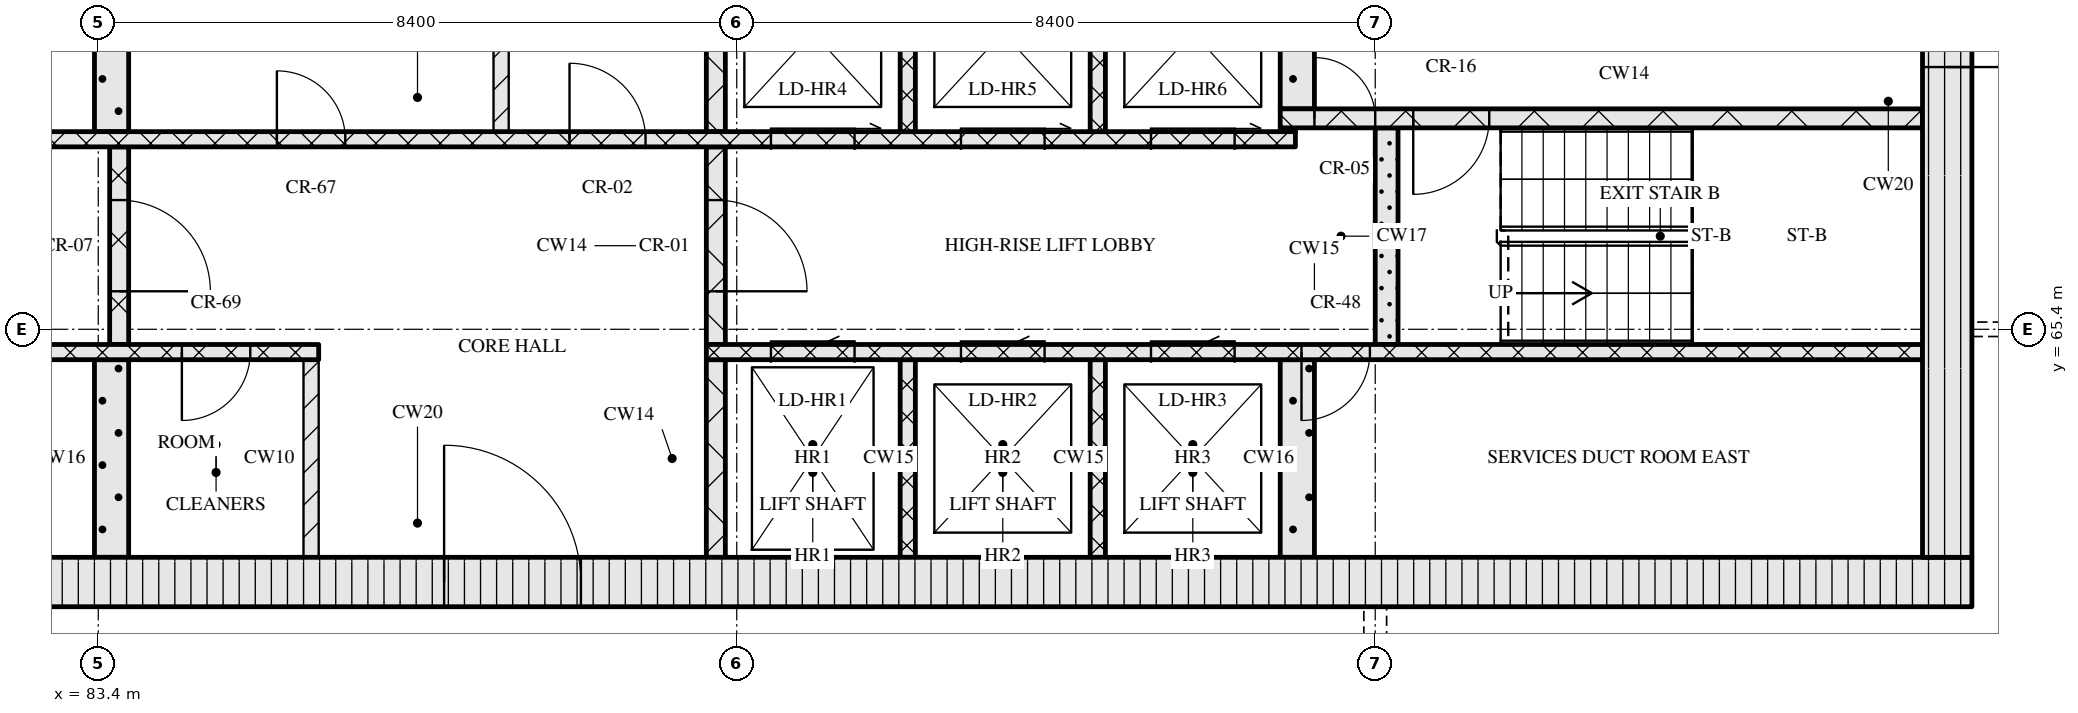
"""IFC4 building model, lengths in metres.
Left out: names, types, materials, properties, quantities, classifications, styles, units other than length and angle.
Written with IfcOpenShell. Run it as: python <this file> out.ifc"""

import sys

from ifc_helpers import new_model, si_unit, direction, frame, frame_2d, origin, place, context, subcontext, project, spatial, rectangle, extrude, element, fill, save


model = new_model("IFC4")
c1 = context("Model", 3, precision=1e-05, world=origin(), true_north=direction((0.0, 1.0)))
c2 = subcontext(c1, "Body", "Model", "MODEL_VIEW")
j1 = project(units=[si_unit("LENGTHUNIT", "METRE"), si_unit("PLANEANGLEUNIT", "RADIAN")], contexts=[c1])
p1 = place(None, origin())
s1 = spatial("IfcSite", under=j1, at=p1, CompositionType="ELEMENT")
p2 = place(p1, origin())
s2 = spatial("IfcBuilding", under=s1, at=p2, CompositionType="ELEMENT")
p3 = place(p2, frame((0.0, 0.0, 219.9)))
s3 = spatial("IfcBuildingStorey", under=s2, at=p3, CompositionType="ELEMENT", Elevation=219.9)
p4 = place(p3, frame((67.15, 62.075, 0.0), z_axis=(0.0, 0.0, 1.0), x_axis=(1.0, 0.0, 0.0)))
e1 = element("IfcWall", 1, at=p4, inside=s3, PredefinedType="SOLIDWALL", context=c2, shape_type="SweptSolid", body=[
    extrude(rectangle(XDim=40.9, YDim=0.65, at=frame_2d((20.45, 0.0))), origin(), (0.0, 0.0, 1.0), 3.32),
])
p5 = place(p4, frame((20.8, 0.0, 0.0)))
e2 = element("IfcOpeningElement", 2, at=p5, cuts=e1, PredefinedType="OPENING", context=c2, shape_type="SweptSolid", body=[
    extrude(rectangle(XDim=1.8, YDim=2.1, at=frame_2d((0.9, 1.05))), frame((0.0, 0.335, 0.0), z_axis=(0.0, -1.0, 0.0), x_axis=(1.0, 0.0, 0.0)), (0.0, 0.0, 1.0), 0.67),
])
p6 = place(p3, frame((107.725, 62.4, 0.0), z_axis=(0.0, 0.0, 1.0), x_axis=(0.0, 1.0, 0.0)))
e3 = element("IfcWall", 3, at=p6, inside=s3, PredefinedType="SOLIDWALL", context=c2, shape_type="SweptSolid", body=[
    extrude(rectangle(XDim=12.0, YDim=0.65, at=frame_2d((6.0, 0.0))), origin(), (0.0, 0.0, 1.0), 3.32),
])
p7 = place(p6, frame((6.45, 0.0, 0.0)))
e4 = element("IfcOpeningElement", 4, at=p7, cuts=e3, PredefinedType="OPENING", context=c2, shape_type="SweptSolid", body=[
    extrude(rectangle(XDim=1.2, YDim=2.1, at=frame_2d((0.6, 1.05))), frame((0.0, 0.335, 0.0), z_axis=(0.0, -1.0, 0.0), x_axis=(1.0, 0.0, 0.0)), (0.0, 0.0, 1.0), 0.67),
])
p8 = place(p3, frame((83.575, 62.4, 0.0), z_axis=(0.0, 0.0, 1.0), x_axis=(0.0, 1.0, 0.0)))
e5 = element("IfcWall", 5, at=p8, inside=s3, PredefinedType="SOLIDWALL", context=c2, shape_type="SweptSolid", body=[
    extrude(rectangle(XDim=2.6, YDim=0.45, at=frame_2d((1.3, 0.0))), origin(), (0.0, 0.0, 1.0), 3.32),
])
p9 = place(p3, frame((86.2, 62.4, 0.0), z_axis=(0.0, 0.0, 1.0), x_axis=(0.0, 1.0, 0.0)))
e6 = element("IfcWall", 6, at=p9, inside=s3, PredefinedType="PARTITIONING", context=c2, shape_type="SweptSolid", body=[
    extrude(rectangle(XDim=2.6, YDim=0.2, at=frame_2d((1.3, 0.0))), origin(), (0.0, 0.0, 1.0), 3.32),
])
p10 = place(p3, frame((91.525, 62.4, 0.0), z_axis=(0.0, 0.0, 1.0), x_axis=(0.0, 1.0, 0.0)))
e7 = element("IfcWall", 7, at=p10, inside=s3, PredefinedType="SOLIDWALL", context=c2, shape_type="SweptSolid", body=[
    extrude(rectangle(XDim=2.6, YDim=0.25, at=frame_2d((1.3, 0.0))), origin(), (0.0, 0.0, 1.0), 3.32),
])
for number, where, z_axis, x_axis in (
    (8, (94.05, 62.4, 0.0), (0.0, 0.0, 1.0), (0.0, 1.0, 0.0)),
    (9, (96.55, 62.4, 0.0), (0.0, 0.0, 1.0), (0.0, 1.0, 0.0)),
):
    element("IfcWall", number, at=place(p3, frame(where, z_axis=z_axis, x_axis=x_axis)), inside=s3, PredefinedType="SOLIDWALL", context=c2, shape_type="SweptSolid", body=[
        extrude(rectangle(XDim=2.6, YDim=0.2, at=frame_2d((1.3, 0.0))), origin(), (0.0, 0.0, 1.0), 3.32),
    ])
p11 = place(p3, frame((99.175, 62.4, 0.0), z_axis=(0.0, 0.0, 1.0), x_axis=(0.0, 1.0, 0.0)))
e10 = element("IfcWall", 10, at=p11, inside=s3, PredefinedType="SOLIDWALL", context=c2, shape_type="SweptSolid", body=[
    extrude(rectangle(XDim=2.6, YDim=0.45, at=frame_2d((1.3, 0.0))), origin(), (0.0, 0.0, 1.0), 3.32),
])
p12 = place(p3, frame((67.8, 65.1, 0.0), z_axis=(0.0, 0.0, 1.0), x_axis=(1.0, 0.0, 0.0)))
e11 = element("IfcWall", 11, at=p12, inside=s3, PredefinedType="SOLIDWALL", context=c2, shape_type="SweptSolid", body=[
    extrude(rectangle(XDim=18.5, YDim=0.2, at=frame_2d((9.25, 0.0))), origin(), (0.0, 0.0, 1.0), 3.32),
])
p13 = place(p12, frame((7.27, 0.0, 0.0)))
e12 = element("IfcOpeningElement", 12, at=p13, cuts=e11, PredefinedType="OPENING", context=c2, shape_type="SweptSolid", body=[
    extrude(rectangle(XDim=0.9, YDim=2.1, at=frame_2d((0.45, 1.05))), frame((0.0, 0.11, 0.0), z_axis=(0.0, -1.0, 0.0), x_axis=(1.0, 0.0, 0.0)), (0.0, 0.0, 1.0), 0.22),
])
p14 = place(p12, frame((10.1, 0.0, 0.0)))
e13 = element("IfcOpeningElement", 13, at=p14, cuts=e11, PredefinedType="OPENING", context=c2, shape_type="SweptSolid", body=[
    extrude(rectangle(XDim=0.9, YDim=2.1, at=frame_2d((0.45, 1.05))), frame((0.0, 0.11, 0.0), z_axis=(0.0, -1.0, 0.0), x_axis=(1.0, 0.0, 0.0)), (0.0, 0.0, 1.0), 0.22),
])
p15 = place(p12, frame((13.81, 0.0, 0.0)))
e14 = element("IfcOpeningElement", 14, at=p15, cuts=e11, PredefinedType="OPENING", context=c2, shape_type="SweptSolid", body=[
    extrude(rectangle(XDim=0.9, YDim=2.1, at=frame_2d((0.45, 1.05))), frame((0.0, 0.11, 0.0), z_axis=(0.0, -1.0, 0.0), x_axis=(1.0, 0.0, 0.0)), (0.0, 0.0, 1.0), 0.22),
])
p16 = place(p12, frame((16.7, 0.0, 0.0)))
e15 = element("IfcOpeningElement", 15, at=p16, cuts=e11, PredefinedType="OPENING", context=c2, shape_type="SweptSolid", body=[
    extrude(rectangle(XDim=0.9, YDim=2.1, at=frame_2d((0.45, 1.05))), frame((0.0, 0.11, 0.0), z_axis=(0.0, -1.0, 0.0), x_axis=(1.0, 0.0, 0.0)), (0.0, 0.0, 1.0), 0.22),
])
p17 = place(p3, frame((91.4, 65.1, 0.0), z_axis=(0.0, 0.0, 1.0), x_axis=(1.0, 0.0, 0.0)))
e16 = element("IfcWall", 16, at=p17, inside=s3, PredefinedType="SOLIDWALL", context=c2, shape_type="SweptSolid", body=[
    extrude(rectangle(XDim=16.0, YDim=0.2, at=frame_2d((8.0, 0.0))), origin(), (0.0, 0.0, 1.0), 3.32),
])
p18 = place(p17, frame((0.85, 0.0, 0.0)))
e17 = element("IfcOpeningElement", 17, at=p18, cuts=e16, PredefinedType="OPENING", context=c2, shape_type="SweptSolid", body=[
    extrude(rectangle(XDim=1.1, YDim=2.1, at=frame_2d((0.55, 1.05))), frame((0.0, 0.11, 0.0), z_axis=(0.0, -1.0, 0.0), x_axis=(1.0, 0.0, 0.0)), (0.0, 0.0, 1.0), 0.22),
])
p19 = place(p17, frame((3.35, 0.0, 0.0)))
e18 = element("IfcOpeningElement", 18, at=p19, cuts=e16, PredefinedType="OPENING", context=c2, shape_type="SweptSolid", body=[
    extrude(rectangle(XDim=1.1, YDim=2.1, at=frame_2d((0.55, 1.05))), frame((0.0, 0.11, 0.0), z_axis=(0.0, -1.0, 0.0), x_axis=(1.0, 0.0, 0.0)), (0.0, 0.0, 1.0), 0.22),
])
p20 = place(p17, frame((5.85, 0.0, 0.0)))
e19 = element("IfcOpeningElement", 19, at=p20, cuts=e16, PredefinedType="OPENING", context=c2, shape_type="SweptSolid", body=[
    extrude(rectangle(XDim=1.1, YDim=2.1, at=frame_2d((0.55, 1.05))), frame((0.0, 0.11, 0.0), z_axis=(0.0, -1.0, 0.0), x_axis=(1.0, 0.0, 0.0)), (0.0, 0.0, 1.0), 0.22),
])
p21 = place(p17, frame((7.83, 0.0, 0.0)))
e20 = element("IfcOpeningElement", 20, at=p21, cuts=e16, PredefinedType="OPENING", context=c2, shape_type="SweptSolid", body=[
    extrude(rectangle(XDim=0.9, YDim=2.1, at=frame_2d((0.45, 1.05))), frame((0.0, 0.11, 0.0), z_axis=(0.0, -1.0, 0.0), x_axis=(1.0, 0.0, 0.0)), (0.0, 0.0, 1.0), 0.22),
])
p22 = place(p3, frame((83.675, 65.2, 0.0), z_axis=(0.0, 0.0, 1.0), x_axis=(0.0, 1.0, 0.0)))
e21 = element("IfcWall", 21, at=p22, inside=s3, PredefinedType="SOLIDWALL", context=c2, shape_type="SweptSolid", body=[
    extrude(rectangle(XDim=2.6, YDim=0.25, at=frame_2d((1.3, 0.0))), origin(), (0.0, 0.0, 1.0), 3.32),
])
p23 = place(p22, frame((0.7, 0.0, 0.0)))
e22 = element("IfcOpeningElement", 22, at=p23, cuts=e21, PredefinedType="OPENING", context=c2, shape_type="SweptSolid", body=[
    extrude(rectangle(XDim=1.2, YDim=2.1, at=frame_2d((0.6, 1.05))), frame((0.0, 0.135, 0.0), z_axis=(0.0, -1.0, 0.0), x_axis=(1.0, 0.0, 0.0)), (0.0, 0.0, 1.0), 0.27),
])
p24 = place(p3, frame((91.525, 65.2, 0.0), z_axis=(0.0, 0.0, 1.0), x_axis=(0.0, 1.0, 0.0)))
e23 = element("IfcWall", 23, at=p24, inside=s3, PredefinedType="SOLIDWALL", context=c2, shape_type="SweptSolid", body=[
    extrude(rectangle(XDim=2.6, YDim=0.25, at=frame_2d((1.3, 0.0))), origin(), (0.0, 0.0, 1.0), 3.32),
])
p25 = place(p24, frame((0.7, 0.0, 0.0)))
e24 = element("IfcOpeningElement", 24, at=p25, cuts=e23, PredefinedType="OPENING", context=c2, shape_type="SweptSolid", body=[
    extrude(rectangle(XDim=1.2, YDim=2.1, at=frame_2d((0.6, 1.05))), frame((0.0, 0.135, 0.0), z_axis=(0.0, -1.0, 0.0), x_axis=(1.0, 0.0, 0.0)), (0.0, 0.0, 1.0), 0.27),
])
p26 = place(p3, frame((100.35, 65.2, 0.0), z_axis=(0.0, 0.0, 1.0), x_axis=(0.0, 1.0, 0.0)))
e25 = element("IfcWall", 25, at=p26, inside=s3, PredefinedType="SOLIDWALL", context=c2, shape_type="SweptSolid", body=[
    extrude(rectangle(XDim=2.85, YDim=0.3, at=frame_2d((1.425, 0.0))), origin(), (0.0, 0.0, 1.0), 3.32),
])
p27 = place(p3, frame((76.05, 67.9, 0.0), z_axis=(0.0, 0.0, 1.0), x_axis=(1.0, 0.0, 0.0)))
e26 = element("IfcWall", 26, at=p27, inside=s3, PredefinedType="SOLIDWALL", context=c2, shape_type="SweptSolid", body=[
    extrude(rectangle(XDim=23.1, YDim=0.2, at=frame_2d((11.55, 0.0))), origin(), (0.0, 0.0, 1.0), 3.32),
])
p28 = place(p27, frame((3.2, 0.0, 0.0)))
e27 = element("IfcOpeningElement", 27, at=p28, cuts=e26, PredefinedType="OPENING", context=c2, shape_type="SweptSolid", body=[
    extrude(rectangle(XDim=0.9, YDim=2.1, at=frame_2d((0.45, 1.05))), frame((0.0, 0.11, 0.0), z_axis=(0.0, -1.0, 0.0), x_axis=(1.0, 0.0, 0.0)), (0.0, 0.0, 1.0), 0.22),
])
p29 = place(p27, frame((9.7, 0.0, 0.0)))
e28 = element("IfcOpeningElement", 28, at=p29, cuts=e26, PredefinedType="OPENING", context=c2, shape_type="SweptSolid", body=[
    extrude(rectangle(XDim=0.9, YDim=2.1, at=frame_2d((0.45, 1.05))), frame((0.0, 0.11, 0.0), z_axis=(0.0, -1.0, 0.0), x_axis=(1.0, 0.0, 0.0)), (0.0, 0.0, 1.0), 0.22),
])
p30 = place(p27, frame((13.55, 0.0, 0.0)))
e29 = element("IfcOpeningElement", 29, at=p30, cuts=e26, PredefinedType="OPENING", context=c2, shape_type="SweptSolid", body=[
    extrude(rectangle(XDim=1.0, YDim=2.1, at=frame_2d((0.5, 1.05))), frame((0.0, 0.11, 0.0), z_axis=(0.0, -1.0, 0.0), x_axis=(1.0, 0.0, 0.0)), (0.0, 0.0, 1.0), 0.22),
])
p31 = place(p27, frame((16.2, 0.0, 0.0)))
e30 = element("IfcOpeningElement", 30, at=p31, cuts=e26, PredefinedType="OPENING", context=c2, shape_type="SweptSolid", body=[
    extrude(rectangle(XDim=1.1, YDim=2.1, at=frame_2d((0.55, 1.05))), frame((0.0, 0.11, 0.0), z_axis=(0.0, -1.0, 0.0), x_axis=(1.0, 0.0, 0.0)), (0.0, 0.0, 1.0), 0.22),
])
p32 = place(p27, frame((18.7, 0.0, 0.0)))
e31 = element("IfcOpeningElement", 31, at=p32, cuts=e26, PredefinedType="OPENING", context=c2, shape_type="SweptSolid", body=[
    extrude(rectangle(XDim=1.1, YDim=2.1, at=frame_2d((0.55, 1.05))), frame((0.0, 0.11, 0.0), z_axis=(0.0, -1.0, 0.0), x_axis=(1.0, 0.0, 0.0)), (0.0, 0.0, 1.0), 0.22),
])
p33 = place(p27, frame((21.2, 0.0, 0.0)))
e32 = element("IfcOpeningElement", 32, at=p33, cuts=e26, PredefinedType="OPENING", context=c2, shape_type="SweptSolid", body=[
    extrude(rectangle(XDim=1.1, YDim=2.1, at=frame_2d((0.55, 1.05))), frame((0.0, 0.11, 0.0), z_axis=(0.0, -1.0, 0.0), x_axis=(1.0, 0.0, 0.0)), (0.0, 0.0, 1.0), 0.22),
])
p34 = place(p3, frame((83.575, 68.0, 0.0), z_axis=(0.0, 0.0, 1.0), x_axis=(0.0, 1.0, 0.0)))
e33 = element("IfcWall", 33, at=p34, inside=s3, PredefinedType="SOLIDWALL", context=c2, shape_type="SweptSolid", body=[
    extrude(rectangle(XDim=2.6, YDim=0.45, at=frame_2d((1.3, 0.0))), origin(), (0.0, 0.0, 1.0), 3.32),
])
p35 = place(p3, frame((88.7, 68.0, 0.0), z_axis=(0.0, 0.0, 1.0), x_axis=(0.0, 1.0, 0.0)))
e34 = element("IfcWall", 34, at=p35, inside=s3, PredefinedType="PARTITIONING", context=c2, shape_type="SweptSolid", body=[
    extrude(rectangle(XDim=2.6, YDim=0.2, at=frame_2d((1.3, 0.0))), origin(), (0.0, 0.0, 1.0), 3.32),
])
p36 = place(p3, frame((91.525, 68.0, 0.0), z_axis=(0.0, 0.0, 1.0), x_axis=(0.0, 1.0, 0.0)))
e35 = element("IfcWall", 35, at=p36, inside=s3, PredefinedType="SOLIDWALL", context=c2, shape_type="SweptSolid", body=[
    extrude(rectangle(XDim=2.6, YDim=0.25, at=frame_2d((1.3, 0.0))), origin(), (0.0, 0.0, 1.0), 3.32),
])
for number, where, z_axis, x_axis in (
    (36, (94.05, 68.0, 0.0), (0.0, 0.0, 1.0), (0.0, 1.0, 0.0)),
    (37, (96.55, 68.0, 0.0), (0.0, 0.0, 1.0), (0.0, 1.0, 0.0)),
):
    element("IfcWall", number, at=place(p3, frame(where, z_axis=z_axis, x_axis=x_axis)), inside=s3, PredefinedType="SOLIDWALL", context=c2, shape_type="SweptSolid", body=[
        extrude(rectangle(XDim=2.6, YDim=0.2, at=frame_2d((1.3, 0.0))), origin(), (0.0, 0.0, 1.0), 3.32),
    ])
p37 = place(p3, frame((98.95, 68.025, 0.0), z_axis=(0.0, 0.0, 1.0), x_axis=(1.0, 0.0, 0.0)))
e38 = element("IfcWall", 38, at=p37, inside=s3, PredefinedType="SOLIDWALL", context=c2, shape_type="SweptSolid", body=[
    extrude(rectangle(XDim=0.2, YDim=0.05, at=frame_2d((0.1, 0.0))), origin(), (0.0, 0.0, 1.0), 3.32),
])
p38 = place(p3, frame((98.95, 68.175, 0.0), z_axis=(0.0, 0.0, 1.0), x_axis=(1.0, 0.0, 0.0)))
e39 = element("IfcWall", 39, at=p38, inside=s3, PredefinedType="SOLIDWALL", context=c2, shape_type="SweptSolid", body=[
    extrude(rectangle(XDim=8.45, YDim=0.25, at=frame_2d((4.225, 0.0))), origin(), (0.0, 0.0, 1.0), 3.32),
])
p39 = place(p38, frame((0.45, 0.0, 0.0)))
e40 = element("IfcOpeningElement", 40, at=p39, cuts=e39, PredefinedType="OPENING", context=c2, shape_type="SweptSolid", body=[
    extrude(rectangle(XDim=0.8, YDim=2.1, at=frame_2d((0.4, 1.05))), frame((0.0, 0.135, 0.0), z_axis=(0.0, -1.0, 0.0), x_axis=(1.0, 0.0, 0.0)), (0.0, 0.0, 1.0), 0.27),
])
p40 = place(p38, frame((1.75, 0.0, 0.0)))
e41 = element("IfcOpeningElement", 41, at=p40, cuts=e39, PredefinedType="OPENING", context=c2, shape_type="SweptSolid", body=[
    extrude(rectangle(XDim=1.0, YDim=2.1, at=frame_2d((0.5, 1.05))), frame((0.0, 0.135, 0.0), z_axis=(0.0, -1.0, 0.0), x_axis=(1.0, 0.0, 0.0)), (0.0, 0.0, 1.0), 0.27),
])
p41 = place(p3, frame((99.175, 68.3, 0.0), z_axis=(0.0, 0.0, 1.0), x_axis=(0.0, 1.0, 0.0)))
e42 = element("IfcWall", 42, at=p41, inside=s3, PredefinedType="SOLIDWALL", context=c2, shape_type="SweptSolid", body=[
    extrude(rectangle(XDim=2.3, YDim=0.45, at=frame_2d((1.15, 0.0))), origin(), (0.0, 0.0, 1.0), 3.32),
])
p42 = place(p5, origin())
e43 = element("IfcDoor", 43, at=p42, inside=s3, OperationType="DOUBLE_DOOR_SINGLE_SWING", PredefinedType="DOOR", context=c2, shape_type="SweptSolid", body=[
    extrude(rectangle(XDim=1.8, YDim=2.1, at=frame_2d((0.9, 1.05))), frame((0.0, 0.025, 0.0), z_axis=(0.0, -1.0, 0.0), x_axis=(1.0, 0.0, 0.0)), (0.0, 0.0, 1.0), 0.05),
])
fill(e2, e43)
p43 = place(p16, origin())
e44 = element("IfcDoor", 44, at=p43, inside=s3, OperationType="SINGLE_SWING_RIGHT", PredefinedType="DOOR", context=c2, shape_type="SweptSolid", body=[
    extrude(rectangle(XDim=0.9, YDim=2.1, at=frame_2d((0.45, 1.05))), frame((0.0, 0.025, 0.0), z_axis=(0.0, -1.0, 0.0), x_axis=(1.0, 0.0, 0.0)), (0.0, 0.0, 1.0), 0.05),
])
fill(e15, e44)
p44 = place(p18, origin())
e45 = element("IfcDoor", 45, at=p44, inside=s3, OperationType="SLIDING_TO_LEFT", PredefinedType="DOOR", context=c2, shape_type="SweptSolid", body=[
    extrude(rectangle(XDim=1.1, YDim=2.1, at=frame_2d((0.55, 1.05))), frame((0.0, 0.025, 0.0), z_axis=(0.0, -1.0, 0.0), x_axis=(1.0, 0.0, 0.0)), (0.0, 0.0, 1.0), 0.05),
])
fill(e17, e45)
p45 = place(p19, origin())
e46 = element("IfcDoor", 46, at=p45, inside=s3, OperationType="SLIDING_TO_LEFT", PredefinedType="DOOR", context=c2, shape_type="SweptSolid", body=[
    extrude(rectangle(XDim=1.1, YDim=2.1, at=frame_2d((0.55, 1.05))), frame((0.0, 0.025, 0.0), z_axis=(0.0, -1.0, 0.0), x_axis=(1.0, 0.0, 0.0)), (0.0, 0.0, 1.0), 0.05),
])
fill(e18, e46)
p46 = place(p20, origin())
e47 = element("IfcDoor", 47, at=p46, inside=s3, OperationType="SLIDING_TO_LEFT", PredefinedType="DOOR", context=c2, shape_type="SweptSolid", body=[
    extrude(rectangle(XDim=1.1, YDim=2.1, at=frame_2d((0.55, 1.05))), frame((0.0, 0.025, 0.0), z_axis=(0.0, -1.0, 0.0), x_axis=(1.0, 0.0, 0.0)), (0.0, 0.0, 1.0), 0.05),
])
fill(e19, e47)
p47 = place(p21, origin())
e48 = element("IfcDoor", 48, at=p47, inside=s3, OperationType="SINGLE_SWING_RIGHT", PredefinedType="DOOR", context=c2, shape_type="SweptSolid", body=[
    extrude(rectangle(XDim=0.9, YDim=2.1, at=frame_2d((0.45, 1.05))), frame((0.0, 0.025, 0.0), z_axis=(0.0, -1.0, 0.0), x_axis=(1.0, 0.0, 0.0)), (0.0, 0.0, 1.0), 0.05),
])
fill(e20, e48)
p48 = place(p23, origin())
e49 = element("IfcDoor", 49, at=p48, inside=s3, OperationType="SINGLE_SWING_RIGHT", PredefinedType="DOOR", context=c2, shape_type="SweptSolid", body=[
    extrude(rectangle(XDim=1.2, YDim=2.1, at=frame_2d((0.6, 1.05))), frame((0.0, 0.025, 0.0), z_axis=(0.0, -1.0, 0.0), x_axis=(1.0, 0.0, 0.0)), (0.0, 0.0, 1.0), 0.05),
])
fill(e22, e49)
p49 = place(p25, origin())
e50 = element("IfcDoor", 50, at=p49, inside=s3, OperationType="SINGLE_SWING_RIGHT", PredefinedType="DOOR", context=c2, shape_type="SweptSolid", body=[
    extrude(rectangle(XDim=1.2, YDim=2.1, at=frame_2d((0.6, 1.05))), frame((0.0, 0.025, 0.0), z_axis=(0.0, -1.0, 0.0), x_axis=(1.0, 0.0, 0.0)), (0.0, 0.0, 1.0), 0.05),
])
fill(e24, e50)
p50 = place(p29, origin())
e51 = element("IfcDoor", 51, at=p50, inside=s3, OperationType="SINGLE_SWING_LEFT", PredefinedType="DOOR", context=c2, shape_type="SweptSolid", body=[
    extrude(rectangle(XDim=0.9, YDim=2.1, at=frame_2d((0.45, 1.05))), frame((0.0, 0.025, 0.0), z_axis=(0.0, -1.0, 0.0), x_axis=(1.0, 0.0, 0.0)), (0.0, 0.0, 1.0), 0.05),
])
fill(e28, e51)
p51 = place(p30, origin())
e52 = element("IfcDoor", 52, at=p51, inside=s3, OperationType="SINGLE_SWING_LEFT", PredefinedType="DOOR", context=c2, shape_type="SweptSolid", body=[
    extrude(rectangle(XDim=1.0, YDim=2.1, at=frame_2d((0.5, 1.05))), frame((0.0, 0.025, 0.0), z_axis=(0.0, -1.0, 0.0), x_axis=(1.0, 0.0, 0.0)), (0.0, 0.0, 1.0), 0.05),
])
fill(e29, e52)
p52 = place(p31, origin())
e53 = element("IfcDoor", 53, at=p52, inside=s3, OperationType="SLIDING_TO_RIGHT", PredefinedType="DOOR", context=c2, shape_type="SweptSolid", body=[
    extrude(rectangle(XDim=1.1, YDim=2.1, at=frame_2d((0.55, 1.05))), frame((0.0, 0.025, 0.0), z_axis=(0.0, -1.0, 0.0), x_axis=(1.0, 0.0, 0.0)), (0.0, 0.0, 1.0), 0.05),
])
fill(e30, e53)
p53 = place(p32, origin())
e54 = element("IfcDoor", 54, at=p53, inside=s3, OperationType="SLIDING_TO_RIGHT", PredefinedType="DOOR", context=c2, shape_type="SweptSolid", body=[
    extrude(rectangle(XDim=1.1, YDim=2.1, at=frame_2d((0.55, 1.05))), frame((0.0, 0.025, 0.0), z_axis=(0.0, -1.0, 0.0), x_axis=(1.0, 0.0, 0.0)), (0.0, 0.0, 1.0), 0.05),
])
fill(e31, e54)
p54 = place(p33, origin())
e55 = element("IfcDoor", 55, at=p54, inside=s3, OperationType="SLIDING_TO_RIGHT", PredefinedType="DOOR", context=c2, shape_type="SweptSolid", body=[
    extrude(rectangle(XDim=1.1, YDim=2.1, at=frame_2d((0.55, 1.05))), frame((0.0, 0.025, 0.0), z_axis=(0.0, -1.0, 0.0), x_axis=(1.0, 0.0, 0.0)), (0.0, 0.0, 1.0), 0.05),
])
fill(e32, e55)
p55 = place(p39, origin())
e56 = element("IfcDoor", 56, at=p55, inside=s3, OperationType="SINGLE_SWING_LEFT", PredefinedType="DOOR", context=c2, shape_type="SweptSolid", body=[
    extrude(rectangle(XDim=0.8, YDim=2.1, at=frame_2d((0.4, 1.05))), frame((0.0, 0.025, 0.0), z_axis=(0.0, -1.0, 0.0), x_axis=(1.0, 0.0, 0.0)), (0.0, 0.0, 1.0), 0.05),
])
fill(e40, e56)
p56 = place(p40, origin())
e57 = element("IfcDoor", 57, at=p56, inside=s3, OperationType="SINGLE_SWING_RIGHT", PredefinedType="DOOR", context=c2, shape_type="SweptSolid", body=[
    extrude(rectangle(XDim=1.0, YDim=2.1, at=frame_2d((0.5, 1.05))), frame((0.0, 0.025, 0.0), z_axis=(0.0, -1.0, 0.0), x_axis=(1.0, 0.0, 0.0)), (0.0, 0.0, 1.0), 0.05),
])
fill(e41, e57)
p57 = place(p7, origin())
e58 = element("IfcDoor", 58, at=p57, inside=s3, OperationType="SINGLE_SWING_RIGHT", PredefinedType="DOOR", context=c2, shape_type="SweptSolid", body=[
    extrude(rectangle(XDim=1.2, YDim=2.1, at=frame_2d((0.6, 1.05))), frame((0.0, 0.025, 0.0), z_axis=(0.0, -1.0, 0.0), x_axis=(1.0, 0.0, 0.0)), (0.0, 0.0, 1.0), 0.05),
])
fill(e4, e58)
save(model, sys.argv[1])
